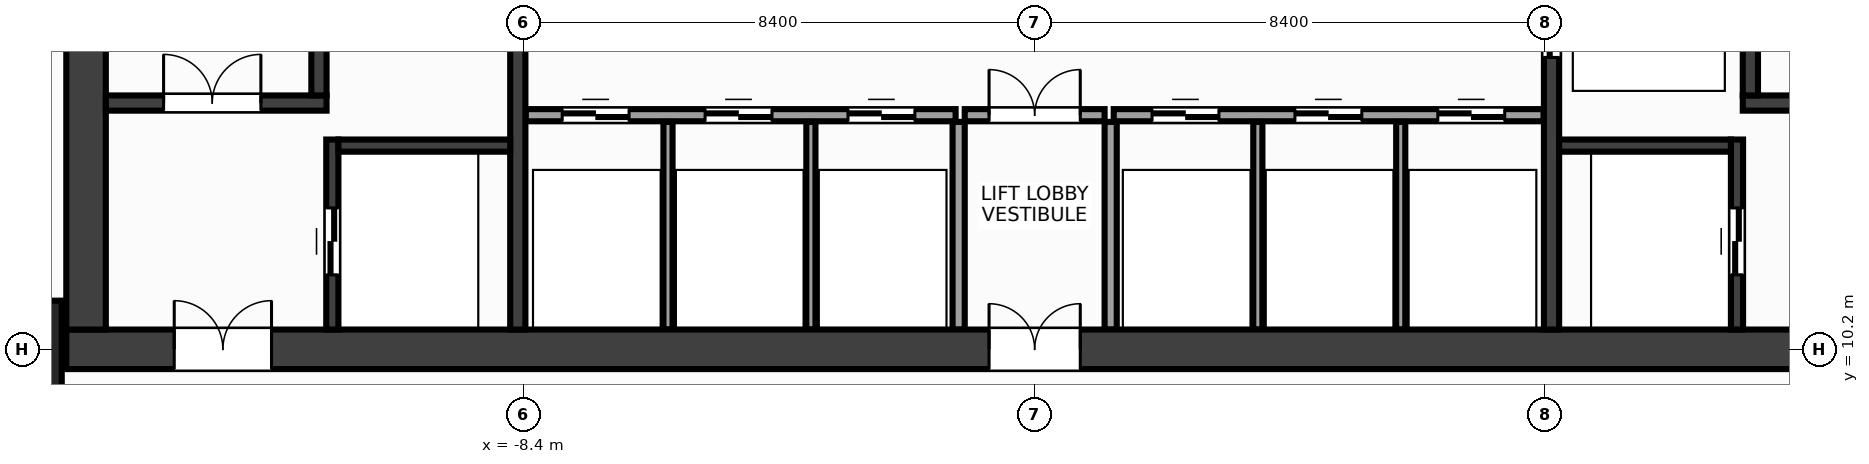
"""IFC4 building model, lengths in metres.
Left out: names, types, materials, properties, quantities, classifications, styles, units other than length and angle.
Written with IfcOpenShell. Run it as: python <this file> out.ifc"""

import sys

from ifc_helpers import new_model, si_unit, direction, frame, frame_2d, origin, origin_2d, place, context, subcontext, project, spatial, rectangle, extrude, source, transform, mapped, element, fill, save


model = new_model("IFC4")
c1 = context("Model", 3, precision=1e-05, world=origin(), true_north=direction((0.0, 1.0)))
c2 = subcontext(c1, "Body", "Model", "MODEL_VIEW")
j1 = project(units=[si_unit("LENGTHUNIT", "METRE"), si_unit("PLANEANGLEUNIT", "RADIAN")], contexts=[c1])
p1 = place(None, origin())
s1 = spatial("IfcSite", under=j1, at=p1, CompositionType="ELEMENT")
p2 = place(p1, origin())
s2 = spatial("IfcBuilding", under=s1, at=p2, CompositionType="ELEMENT")
p3 = place(p2, frame((0.0, 0.0, 77.6)))
s3 = spatial("IfcBuildingStorey", under=s2, at=p3, CompositionType="ELEMENT", Elevation=77.6)
m1 = source(origin(), c2, "Body", "SweptSolid", [
    extrude(rectangle(XDim=31.85, YDim=0.65, at=frame_2d((15.925, 0.0))), origin(), (0.0, 0.0, 1.0), 3.6),
])
p4 = place(p3, frame((-15.925, 10.2, 0.0), z_axis=(0.0, 0.0, 1.0), x_axis=(1.0, 0.0, 0.0)))
e1 = element("IfcWall", 1, at=p4, inside=s3, PredefinedType="SHEAR", context=c2, shape_type="MappedRepresentation", body=[
    mapped(m1, transform((0.0, 0.0, 0.0), x_axis=(1.0, 0.0, 0.0), y_axis=(0.0, 1.0, 0.0), z_axis=(0.0, 0.0, 1.0), scale=1.0)),
])
p5 = place(p4, frame((1.775, 0.0, 0.0)))
e2 = element("IfcOpeningElement", 2, at=p5, cuts=e1, PredefinedType="OPENING", context=c2, shape_type="SweptSolid", body=[
    extrude(rectangle(XDim=1.6, YDim=2.15, at=frame_2d((0.8, 1.075))), frame((0.0, 0.337, 0.0), z_axis=(0.0, -1.0, 0.0), x_axis=(1.0, 0.0, 0.0)), (0.0, 0.0, 1.0), 0.674),
])
p6 = place(p4, frame((28.475, 0.0, 0.0)))
e3 = element("IfcOpeningElement", 3, at=p6, cuts=e1, PredefinedType="OPENING", context=c2, shape_type="SweptSolid", body=[
    extrude(rectangle(XDim=1.6, YDim=2.15, at=frame_2d((0.8, 1.075))), frame((0.0, 0.337, 0.0), z_axis=(0.0, -1.0, 0.0), x_axis=(1.0, 0.0, 0.0)), (0.0, 0.0, 1.0), 0.674),
])
p7 = place(p4, frame((15.175, 0.0, 0.0)))
e4 = element("IfcOpeningElement", 4, at=p7, cuts=e1, PredefinedType="OPENING", context=c2, shape_type="SweptSolid", body=[
    extrude(rectangle(XDim=1.5, YDim=2.2, at=frame_2d((0.75, 1.1))), frame((0.0, 0.337, 0.0), z_axis=(0.0, -1.0, 0.0), x_axis=(1.0, 0.0, 0.0)), (0.0, 0.0, 1.0), 0.674),
])
m2 = source(origin(), c2, "Body", "SweptSolid", [
    extrude(rectangle(XDim=12.95, YDim=0.65, at=frame_2d((6.475, 0.0))), origin(), (0.0, 0.0, 1.0), 3.6),
])
p8 = place(p3, frame((-15.6, 10.525, 0.0), z_axis=(0.0, 0.0, 1.0), x_axis=(0.0, 1.0, 0.0)))
e5 = element("IfcWall", 5, at=p8, inside=s3, PredefinedType="SHEAR", context=c2, shape_type="MappedRepresentation", body=[
    mapped(m2, transform((0.0, 0.0, 0.0), x_axis=(1.0, 0.0, 0.0), y_axis=(0.0, 1.0, 0.0), z_axis=(0.0, 0.0, 1.0), scale=1.0)),
])
m3 = source(origin(), c2, "Body", "SweptSolid", [
    extrude(rectangle(XDim=12.95, YDim=0.25, at=frame_2d((6.475, 0.0))), origin(), (0.0, 0.0, 1.0), 3.6),
])
p9 = place(p3, frame((-8.5, 10.525, 0.0), z_axis=(0.0, 0.0, 1.0), x_axis=(0.0, 1.0, 0.0)))
e6 = element("IfcWall", 6, at=p9, inside=s3, PredefinedType="SHEAR", context=c2, shape_type="MappedRepresentation", body=[
    mapped(m3, transform((0.0, 0.0, 0.0), x_axis=(1.0, 0.0, 0.0), y_axis=(0.0, 1.0, 0.0), z_axis=(0.0, 0.0, 1.0), scale=1.0)),
])
p10 = place(p9, frame((5.075, 0.0, 0.0)))
e7 = element("IfcOpeningElement", 7, at=p10, cuts=e6, PredefinedType="OPENING", context=c2, shape_type="SweptSolid", body=[
    extrude(rectangle(XDim=0.95, YDim=2.15, at=frame_2d((0.475, 1.075))), frame((0.0, 0.137, 0.0), z_axis=(0.0, -1.0, 0.0), x_axis=(1.0, 0.0, 0.0)), (0.0, 0.0, 1.0), 0.274),
])
p11 = place(p9, frame((8.175, 0.0, 0.0)))
e8 = element("IfcOpeningElement", 8, at=p11, cuts=e6, PredefinedType="OPENING", context=c2, shape_type="SweptSolid", body=[
    extrude(rectangle(XDim=0.95, YDim=2.15, at=frame_2d((0.475, 1.075))), frame((0.0, 0.137, 0.0), z_axis=(0.0, -1.0, 0.0), x_axis=(1.0, 0.0, 0.0)), (0.0, 0.0, 1.0), 0.274),
])
p12 = place(p3, frame((8.5, 10.525, 0.0), z_axis=(0.0, 0.0, 1.0), x_axis=(0.0, 1.0, 0.0)))
e9 = element("IfcWall", 9, at=p12, inside=s3, PredefinedType="SHEAR", context=c2, shape_type="MappedRepresentation", body=[
    mapped(m3, transform((0.0, 0.0, 0.0), x_axis=(1.0, 0.0, 0.0), y_axis=(0.0, 1.0, 0.0), z_axis=(0.0, 0.0, 1.0), scale=1.0)),
])
p13 = place(p12, frame((4.475, 0.0, 0.0)))
e10 = element("IfcOpeningElement", 10, at=p13, cuts=e9, PredefinedType="OPENING", context=c2, shape_type="SweptSolid", body=[
    extrude(rectangle(XDim=1.1, YDim=2.15, at=frame_2d((0.55, 1.075))), frame((0.0, 0.137, 0.0), z_axis=(0.0, -1.0, 0.0), x_axis=(1.0, 0.0, 0.0)), (0.0, 0.0, 1.0), 0.274),
])
p14 = place(p12, frame((7.025, 0.0, 0.0)))
e11 = element("IfcOpeningElement", 11, at=p14, cuts=e9, PredefinedType="OPENING", context=c2, shape_type="SweptSolid", body=[
    extrude(rectangle(XDim=1.1, YDim=2.15, at=frame_2d((0.55, 1.075))), frame((0.0, 0.137, 0.0), z_axis=(0.0, -1.0, 0.0), x_axis=(1.0, 0.0, 0.0)), (0.0, 0.0, 1.0), 0.274),
])
p15 = place(p12, frame((9.925, 0.0, 0.0)))
e12 = element("IfcOpeningElement", 12, at=p15, cuts=e9, PredefinedType="OPENING", context=c2, shape_type="SweptSolid", body=[
    extrude(rectangle(XDim=0.95, YDim=2.15, at=frame_2d((0.475, 1.075))), frame((0.0, 0.137, 0.0), z_axis=(0.0, -1.0, 0.0), x_axis=(1.0, 0.0, 0.0)), (0.0, 0.0, 1.0), 0.274),
])
m4 = source(origin(), c2, "Body", "SweptSolid", [
    extrude(rectangle(XDim=3.63, YDim=0.25, at=frame_2d((1.815, 0.0))), origin(), (0.0, 0.0, 1.0), 3.6),
])
p16 = place(p3, frame((-15.275, 14.25, 0.0), z_axis=(0.0, 0.0, 1.0), x_axis=(1.0, 0.0, 0.0)))
e13 = element("IfcWall", 13, at=p16, inside=s3, PredefinedType="SHEAR", context=c2, shape_type="MappedRepresentation", body=[
    mapped(m4, transform((0.0, 0.0, 0.0), x_axis=(1.0, 0.0, 0.0), y_axis=(0.0, 1.0, 0.0), z_axis=(0.0, 0.0, 1.0), scale=1.0)),
])
p17 = place(p16, frame((0.95, 0.0, 0.0)))
e14 = element("IfcOpeningElement", 14, at=p17, cuts=e13, PredefinedType="OPENING", context=c2, shape_type="SweptSolid", body=[
    extrude(rectangle(XDim=1.6, YDim=2.15, at=frame_2d((0.8, 1.075))), frame((0.0, 0.137, 0.0), z_axis=(0.0, -1.0, 0.0), x_axis=(1.0, 0.0, 0.0)), (0.0, 0.0, 1.0), 0.274),
])
m5 = source(origin(), c2, "Body", "SweptSolid", [
    extrude(rectangle(XDim=9.1, YDim=0.25, at=frame_2d((4.55, 0.0))), origin(), (0.0, 0.0, 1.0), 3.6),
])
p18 = place(p3, frame((-11.77, 14.375, 0.0), z_axis=(0.0, 0.0, 1.0), x_axis=(0.0, 1.0, 0.0)))
e15 = element("IfcWall", 15, at=p18, inside=s3, PredefinedType="SHEAR", context=c2, shape_type="MappedRepresentation", body=[
    mapped(m5, transform((0.0, 0.0, 0.0), x_axis=(1.0, 0.0, 0.0), y_axis=(0.0, 1.0, 0.0), z_axis=(0.0, 0.0, 1.0), scale=1.0)),
])
p19 = place(p3, frame((11.645, 14.25, 0.0), z_axis=(0.0, 0.0, 1.0), x_axis=(1.0, 0.0, 0.0)))
e16 = element("IfcWall", 16, at=p19, inside=s3, PredefinedType="SHEAR", context=c2, shape_type="MappedRepresentation", body=[
    mapped(m4, transform((0.0, 0.0, 0.0), x_axis=(1.0, 0.0, 0.0), y_axis=(0.0, 1.0, 0.0), z_axis=(0.0, 0.0, 1.0), scale=1.0)),
])
p20 = place(p19, frame((0.95, 0.0, 0.0)))
e17 = element("IfcOpeningElement", 17, at=p20, cuts=e16, PredefinedType="OPENING", context=c2, shape_type="SweptSolid", body=[
    extrude(rectangle(XDim=1.6, YDim=2.15, at=frame_2d((0.8, 1.075))), frame((0.0, 0.137, 0.0), z_axis=(0.0, -1.0, 0.0), x_axis=(1.0, 0.0, 0.0)), (0.0, 0.0, 1.0), 0.274),
])
p21 = place(p3, frame((11.77, 14.375, 0.0), z_axis=(0.0, 0.0, 1.0), x_axis=(0.0, 1.0, 0.0)))
e18 = element("IfcWall", 18, at=p21, inside=s3, PredefinedType="SHEAR", context=c2, shape_type="MappedRepresentation", body=[
    mapped(m5, transform((0.0, 0.0, 0.0), x_axis=(1.0, 0.0, 0.0), y_axis=(0.0, 1.0, 0.0), z_axis=(0.0, 0.0, 1.0), scale=1.0)),
])
m6 = source(origin(), c2, "Body", "SweptSolid", [
    extrude(rectangle(XDim=3.125, YDim=0.2, at=frame_2d((1.562, 0.0))), origin(), (0.0, 0.0, 1.0), 3.6),
])
p22 = place(p3, frame((-11.55, 10.525, 0.0), z_axis=(0.0, 0.0, 1.0), x_axis=(0.0, 1.0, 0.0)))
e19 = element("IfcWall", 19, at=p22, inside=s3, PredefinedType="SHEAR", context=c2, shape_type="MappedRepresentation", body=[
    mapped(m6, transform((0.0, 0.0, 0.0), x_axis=(1.0, 0.0, 0.0), y_axis=(0.0, 1.0, 0.0), z_axis=(0.0, 0.0, 1.0), scale=1.0)),
])
p23 = place(p22, frame((0.9, 0.0, 0.0)))
e20 = element("IfcOpeningElement", 20, at=p23, cuts=e19, PredefinedType="OPENING", context=c2, shape_type="SweptSolid", body=[
    extrude(rectangle(XDim=1.1, YDim=2.15, at=frame_2d((0.55, 1.075))), frame((0.0, 0.112, 0.0), z_axis=(0.0, -1.0, 0.0), x_axis=(1.0, 0.0, 0.0)), (0.0, 0.0, 1.0), 0.224),
])
m7 = source(origin(), c2, "Body", "SweptSolid", [
    extrude(rectangle(XDim=2.825, YDim=0.2, at=frame_2d((1.413, 0.0))), origin(), (0.0, 0.0, 1.0), 3.6),
])
p24 = place(p3, frame((-11.45, 13.55, 0.0), z_axis=(0.0, 0.0, 1.0), x_axis=(1.0, 0.0, 0.0)))
e21 = element("IfcWall", 21, at=p24, inside=s3, PredefinedType="SHEAR", context=c2, shape_type="MappedRepresentation", body=[
    mapped(m7, transform((0.0, 0.0, 0.0), x_axis=(1.0, 0.0, 0.0), y_axis=(0.0, 1.0, 0.0), z_axis=(0.0, 0.0, 1.0), scale=1.0)),
])
p25 = place(p3, frame((11.55, 10.525, 0.0), z_axis=(0.0, 0.0, 1.0), x_axis=(0.0, 1.0, 0.0)))
e22 = element("IfcWall", 22, at=p25, inside=s3, PredefinedType="SHEAR", context=c2, shape_type="MappedRepresentation", body=[
    mapped(m6, transform((0.0, 0.0, 0.0), x_axis=(1.0, 0.0, 0.0), y_axis=(0.0, 1.0, 0.0), z_axis=(0.0, 0.0, 1.0), scale=1.0)),
])
p26 = place(p25, frame((0.9, 0.0, 0.0)))
e23 = element("IfcOpeningElement", 23, at=p26, cuts=e22, PredefinedType="OPENING", context=c2, shape_type="SweptSolid", body=[
    extrude(rectangle(XDim=1.1, YDim=2.15, at=frame_2d((0.55, 1.075))), frame((0.0, 0.112, 0.0), z_axis=(0.0, -1.0, 0.0), x_axis=(1.0, 0.0, 0.0)), (0.0, 0.0, 1.0), 0.224),
])
p27 = place(p3, frame((8.625, 13.55, 0.0), z_axis=(0.0, 0.0, 1.0), x_axis=(1.0, 0.0, 0.0)))
e24 = element("IfcWall", 24, at=p27, inside=s3, PredefinedType="SHEAR", context=c2, shape_type="MappedRepresentation", body=[
    mapped(m7, transform((0.0, 0.0, 0.0), x_axis=(1.0, 0.0, 0.0), y_axis=(0.0, 1.0, 0.0), z_axis=(0.0, 0.0, 1.0), scale=1.0)),
])
m8 = source(origin(), c2, "Body", "SweptSolid", [
    extrude(rectangle(XDim=1.6, YDim=1.6, at=origin_2d()), origin(), (0.0, 0.0, 1.0), 3.6),
])
p28 = place(p3, frame((-16.8, 10.2, 0.0), z_axis=(0.0, 0.0, 1.0), x_axis=(1.0, 0.0, 0.0)))
e25 = element("IfcColumn", 25, at=p28, inside=s3, PredefinedType="COLUMN", context=c2, shape_type="MappedRepresentation", body=[
    mapped(m8, transform((0.0, 0.0, 0.0), x_axis=(1.0, 0.0, 0.0), y_axis=(0.0, 1.0, 0.0), z_axis=(0.0, 0.0, 1.0), scale=1.0)),
])
m9 = source(origin(), c2, "Body", "SweptSolid", [
    extrude(rectangle(XDim=7.07, YDim=0.2, at=frame_2d((3.535, 0.0))), origin(), (0.0, 0.0, 1.0), 3.36),
])
p29 = place(p3, frame((-8.37, 14.05, 0.0), z_axis=(0.0, 0.0, 1.0), x_axis=(1.0, 0.0, 0.0)))
e26 = element("IfcWall", 26, at=p29, inside=s3, PredefinedType="PARTITIONING", context=c2, shape_type="MappedRepresentation", body=[
    mapped(m9, transform((0.0, 0.0, 0.0), x_axis=(1.0, 0.0, 0.0), y_axis=(0.0, 1.0, 0.0), z_axis=(0.0, 0.0, 1.0), scale=1.0)),
])
p30 = place(p29, frame((0.6, 0.0, 0.0)))
e27 = element("IfcOpeningElement", 27, at=p30, cuts=e26, PredefinedType="OPENING", context=c2, shape_type="SweptSolid", body=[
    extrude(rectangle(XDim=1.1, YDim=2.15, at=frame_2d((0.55, 1.075))), frame((0.0, 0.112, 0.0), z_axis=(0.0, -1.0, 0.0), x_axis=(1.0, 0.0, 0.0)), (0.0, 0.0, 1.0), 0.224),
])
p31 = place(p29, frame((2.95, 0.0, 0.0)))
e28 = element("IfcOpeningElement", 28, at=p31, cuts=e26, PredefinedType="OPENING", context=c2, shape_type="SweptSolid", body=[
    extrude(rectangle(XDim=1.1, YDim=2.15, at=frame_2d((0.55, 1.075))), frame((0.0, 0.112, 0.0), z_axis=(0.0, -1.0, 0.0), x_axis=(1.0, 0.0, 0.0)), (0.0, 0.0, 1.0), 0.224),
])
p32 = place(p29, frame((5.3, 0.0, 0.0)))
e29 = element("IfcOpeningElement", 29, at=p32, cuts=e26, PredefinedType="OPENING", context=c2, shape_type="SweptSolid", body=[
    extrude(rectangle(XDim=1.1, YDim=2.15, at=frame_2d((0.55, 1.075))), frame((0.0, 0.112, 0.0), z_axis=(0.0, -1.0, 0.0), x_axis=(1.0, 0.0, 0.0)), (0.0, 0.0, 1.0), 0.224),
])
p33 = place(p3, frame((1.3, 14.05, 0.0), z_axis=(0.0, 0.0, 1.0), x_axis=(1.0, 0.0, 0.0)))
e30 = element("IfcWall", 30, at=p33, inside=s3, PredefinedType="PARTITIONING", context=c2, shape_type="MappedRepresentation", body=[
    mapped(m9, transform((0.0, 0.0, 0.0), x_axis=(1.0, 0.0, 0.0), y_axis=(0.0, 1.0, 0.0), z_axis=(0.0, 0.0, 1.0), scale=1.0)),
])
p34 = place(p33, frame((0.63, 0.0, 0.0)))
e31 = element("IfcOpeningElement", 31, at=p34, cuts=e30, PredefinedType="OPENING", context=c2, shape_type="SweptSolid", body=[
    extrude(rectangle(XDim=1.1, YDim=2.15, at=frame_2d((0.55, 1.075))), frame((0.0, 0.112, 0.0), z_axis=(0.0, -1.0, 0.0), x_axis=(1.0, 0.0, 0.0)), (0.0, 0.0, 1.0), 0.224),
])
p35 = place(p33, frame((2.98, 0.0, 0.0)))
e32 = element("IfcOpeningElement", 32, at=p35, cuts=e30, PredefinedType="OPENING", context=c2, shape_type="SweptSolid", body=[
    extrude(rectangle(XDim=1.1, YDim=2.15, at=frame_2d((0.55, 1.075))), frame((0.0, 0.112, 0.0), z_axis=(0.0, -1.0, 0.0), x_axis=(1.0, 0.0, 0.0)), (0.0, 0.0, 1.0), 0.224),
])
p36 = place(p33, frame((5.33, 0.0, 0.0)))
e33 = element("IfcOpeningElement", 33, at=p36, cuts=e30, PredefinedType="OPENING", context=c2, shape_type="SweptSolid", body=[
    extrude(rectangle(XDim=1.1, YDim=2.15, at=frame_2d((0.55, 1.075))), frame((0.0, 0.112, 0.0), z_axis=(0.0, -1.0, 0.0), x_axis=(1.0, 0.0, 0.0)), (0.0, 0.0, 1.0), 0.224),
])
m10 = source(origin(), c2, "Body", "SweptSolid", [
    extrude(rectangle(XDim=3.415, YDim=0.2, at=frame_2d((1.708, 0.0))), origin(), (0.0, 0.0, 1.0), 3.36),
])
for number, where, z_axis, x_axis in (
    (34, (-1.25, 10.525, 0.0), (0.0, 0.0, 1.0), (0.0, 1.0, 0.0)),
    (35, (1.25, 10.525, 0.0), (0.0, 0.0, 1.0), (0.0, 1.0, 0.0)),
):
    element("IfcWall", number, at=place(p3, frame(where, z_axis=z_axis, x_axis=x_axis)), inside=s3, PredefinedType="PARTITIONING", context=c2, shape_type="MappedRepresentation", body=[
        mapped(m10, transform((0.0, 0.0, 0.0), x_axis=(1.0, 0.0, 0.0), y_axis=(0.0, 1.0, 0.0), z_axis=(0.0, 0.0, 1.0), scale=1.0)),
    ])
m11 = source(origin(), c2, "Body", "SweptSolid", [
    extrude(rectangle(XDim=2.3, YDim=0.2, at=frame_2d((1.15, 0.0))), origin(), (0.0, 0.0, 1.0), 3.36),
])
p37 = place(p3, frame((-1.15, 14.05, 0.0), z_axis=(0.0, 0.0, 1.0), x_axis=(1.0, 0.0, 0.0)))
e36 = element("IfcWall", 36, at=p37, inside=s3, PredefinedType="PARTITIONING", context=c2, shape_type="MappedRepresentation", body=[
    mapped(m11, transform((0.0, 0.0, 0.0), x_axis=(1.0, 0.0, 0.0), y_axis=(0.0, 1.0, 0.0), z_axis=(0.0, 0.0, 1.0), scale=1.0)),
])
p38 = place(p37, frame((0.4, 0.0, 0.0)))
e37 = element("IfcOpeningElement", 37, at=p38, cuts=e36, PredefinedType="OPENING", context=c2, shape_type="SweptSolid", body=[
    extrude(rectangle(XDim=1.5, YDim=2.2, at=frame_2d((0.75, 1.1))), frame((0.0, 0.112, 0.0), z_axis=(0.0, -1.0, 0.0), x_axis=(1.0, 0.0, 0.0)), (0.0, 0.0, 1.0), 0.224),
])
m12 = source(origin(), c2, "Body", "SweptSolid", [
    extrude(rectangle(XDim=3.415, YDim=0.15, at=frame_2d((1.708, 0.0))), origin(), (0.0, 0.0, 1.0), 3.36),
])
for number, where, z_axis, x_axis in (
    (38, (-6.03, 10.525, 0.0), (0.0, 0.0, 1.0), (0.0, 1.0, 0.0)),
    (39, (-3.68, 10.525, 0.0), (0.0, 0.0, 1.0), (0.0, 1.0, 0.0)),
    (40, (3.67, 10.525, 0.0), (0.0, 0.0, 1.0), (0.0, 1.0, 0.0)),
    (41, (6.02, 10.525, 0.0), (0.0, 0.0, 1.0), (0.0, 1.0, 0.0)),
):
    element("IfcWall", number, at=place(p3, frame(where, z_axis=z_axis, x_axis=x_axis)), inside=s3, PredefinedType="PARTITIONING", context=c2, shape_type="MappedRepresentation", body=[
        mapped(m12, transform((0.0, 0.0, 0.0), x_axis=(1.0, 0.0, 0.0), y_axis=(0.0, 1.0, 0.0), z_axis=(0.0, 0.0, 1.0), scale=1.0)),
    ])
m13 = source(origin(), c2, "Body", "SweptSolid", [
    extrude(rectangle(XDim=1.6, YDim=2.15, at=frame_2d((0.8, 1.075))), frame((0.0, 0.025, 0.0), z_axis=(0.0, -1.0, 0.0), x_axis=(1.0, 0.0, 0.0)), (0.0, 0.0, 1.0), 0.05),
])
p39 = place(p17, origin())
e42 = element("IfcDoor", 42, at=p39, inside=s3, OperationType="DOUBLE_DOOR_SINGLE_SWING", PredefinedType="DOOR", context=c2, shape_type="MappedRepresentation", body=[
    mapped(m13, transform((0.0, 0.0, 0.0), x_axis=(1.0, 0.0, 0.0), y_axis=(0.0, 1.0, 0.0), z_axis=(0.0, 0.0, 1.0), scale=1.0)),
])
fill(e14, e42)
p40 = place(p5, origin())
e43 = element("IfcDoor", 43, at=p40, inside=s3, OperationType="DOUBLE_DOOR_SINGLE_SWING", PredefinedType="DOOR", context=c2, shape_type="MappedRepresentation", body=[
    mapped(m13, transform((0.0, 0.0, 0.0), x_axis=(1.0, 0.0, 0.0), y_axis=(0.0, 1.0, 0.0), z_axis=(0.0, 0.0, 1.0), scale=1.0)),
])
fill(e2, e43)
m14 = source(origin(), c2, "Body", "SweptSolid", [
    extrude(rectangle(XDim=1.1, YDim=2.15, at=frame_2d((0.55, 1.075))), frame((0.0, 0.025, 0.0), z_axis=(0.0, -1.0, 0.0), x_axis=(1.0, 0.0, 0.0)), (0.0, 0.0, 1.0), 0.05),
])
p41 = place(p23, origin())
e44 = element("IfcDoor", 44, at=p41, inside=s3, OperationType="DOUBLE_DOOR_SLIDING", PredefinedType="DOOR", context=c2, shape_type="MappedRepresentation", body=[
    mapped(m14, transform((0.0, 0.0, 0.0), x_axis=(1.0, 0.0, 0.0), y_axis=(0.0, 1.0, 0.0), z_axis=(0.0, 0.0, 1.0), scale=1.0)),
])
fill(e20, e44)
p42 = place(p26, origin())
e45 = element("IfcDoor", 45, at=p42, inside=s3, OperationType="DOUBLE_DOOR_SLIDING", PredefinedType="DOOR", context=c2, shape_type="MappedRepresentation", body=[
    mapped(m14, transform((0.0, 0.0, 0.0), x_axis=(1.0, 0.0, 0.0), y_axis=(0.0, 1.0, 0.0), z_axis=(0.0, 0.0, 1.0), scale=1.0)),
])
fill(e23, e45)
p43 = place(p13, origin())
e46 = element("IfcDoor", 46, at=p43, inside=s3, OperationType="DOUBLE_DOOR_SLIDING", PredefinedType="DOOR", context=c2, shape_type="MappedRepresentation", body=[
    mapped(m14, transform((0.0, 0.0, 0.0), x_axis=(1.0, 0.0, 0.0), y_axis=(0.0, 1.0, 0.0), z_axis=(0.0, 0.0, 1.0), scale=1.0)),
])
fill(e10, e46)
p44 = place(p30, origin())
e47 = element("IfcDoor", 47, at=p44, inside=s3, OperationType="DOUBLE_DOOR_SLIDING", PredefinedType="DOOR", context=c2, shape_type="MappedRepresentation", body=[
    mapped(m14, transform((0.0, 0.0, 0.0), x_axis=(1.0, 0.0, 0.0), y_axis=(0.0, 1.0, 0.0), z_axis=(0.0, 0.0, 1.0), scale=1.0)),
])
fill(e27, e47)
p45 = place(p31, origin())
e48 = element("IfcDoor", 48, at=p45, inside=s3, OperationType="DOUBLE_DOOR_SLIDING", PredefinedType="DOOR", context=c2, shape_type="MappedRepresentation", body=[
    mapped(m14, transform((0.0, 0.0, 0.0), x_axis=(1.0, 0.0, 0.0), y_axis=(0.0, 1.0, 0.0), z_axis=(0.0, 0.0, 1.0), scale=1.0)),
])
fill(e28, e48)
p46 = place(p32, origin())
e49 = element("IfcDoor", 49, at=p46, inside=s3, OperationType="DOUBLE_DOOR_SLIDING", PredefinedType="DOOR", context=c2, shape_type="MappedRepresentation", body=[
    mapped(m14, transform((0.0, 0.0, 0.0), x_axis=(1.0, 0.0, 0.0), y_axis=(0.0, 1.0, 0.0), z_axis=(0.0, 0.0, 1.0), scale=1.0)),
])
fill(e29, e49)
p47 = place(p34, origin())
e50 = element("IfcDoor", 50, at=p47, inside=s3, OperationType="DOUBLE_DOOR_SLIDING", PredefinedType="DOOR", context=c2, shape_type="MappedRepresentation", body=[
    mapped(m14, transform((0.0, 0.0, 0.0), x_axis=(1.0, 0.0, 0.0), y_axis=(0.0, 1.0, 0.0), z_axis=(0.0, 0.0, 1.0), scale=1.0)),
])
fill(e31, e50)
p48 = place(p35, origin())
e51 = element("IfcDoor", 51, at=p48, inside=s3, OperationType="DOUBLE_DOOR_SLIDING", PredefinedType="DOOR", context=c2, shape_type="MappedRepresentation", body=[
    mapped(m14, transform((0.0, 0.0, 0.0), x_axis=(1.0, 0.0, 0.0), y_axis=(0.0, 1.0, 0.0), z_axis=(0.0, 0.0, 1.0), scale=1.0)),
])
fill(e32, e51)
p49 = place(p36, origin())
e52 = element("IfcDoor", 52, at=p49, inside=s3, OperationType="DOUBLE_DOOR_SLIDING", PredefinedType="DOOR", context=c2, shape_type="MappedRepresentation", body=[
    mapped(m14, transform((0.0, 0.0, 0.0), x_axis=(1.0, 0.0, 0.0), y_axis=(0.0, 1.0, 0.0), z_axis=(0.0, 0.0, 1.0), scale=1.0)),
])
fill(e33, e52)
m15 = source(origin(), c2, "Body", "SweptSolid", [
    extrude(rectangle(XDim=1.5, YDim=2.2, at=frame_2d((0.75, 1.1))), frame((0.0, 0.025, 0.0), z_axis=(0.0, -1.0, 0.0), x_axis=(1.0, 0.0, 0.0)), (0.0, 0.0, 1.0), 0.05),
])
p50 = place(p38, origin())
e53 = element("IfcDoor", 53, at=p50, inside=s3, OperationType="DOUBLE_DOOR_SINGLE_SWING", PredefinedType="DOOR", context=c2, shape_type="MappedRepresentation", body=[
    mapped(m15, transform((0.0, 0.0, 0.0), x_axis=(1.0, 0.0, 0.0), y_axis=(0.0, 1.0, 0.0), z_axis=(0.0, 0.0, 1.0), scale=1.0)),
])
fill(e37, e53)
p51 = place(p7, origin())
e54 = element("IfcDoor", 54, at=p51, inside=s3, OperationType="DOUBLE_DOOR_SINGLE_SWING", PredefinedType="DOOR", context=c2, shape_type="MappedRepresentation", body=[
    mapped(m15, transform((0.0, 0.0, 0.0), x_axis=(1.0, 0.0, 0.0), y_axis=(0.0, 1.0, 0.0), z_axis=(0.0, 0.0, 1.0), scale=1.0)),
])
fill(e4, e54)
save(model, sys.argv[1])
